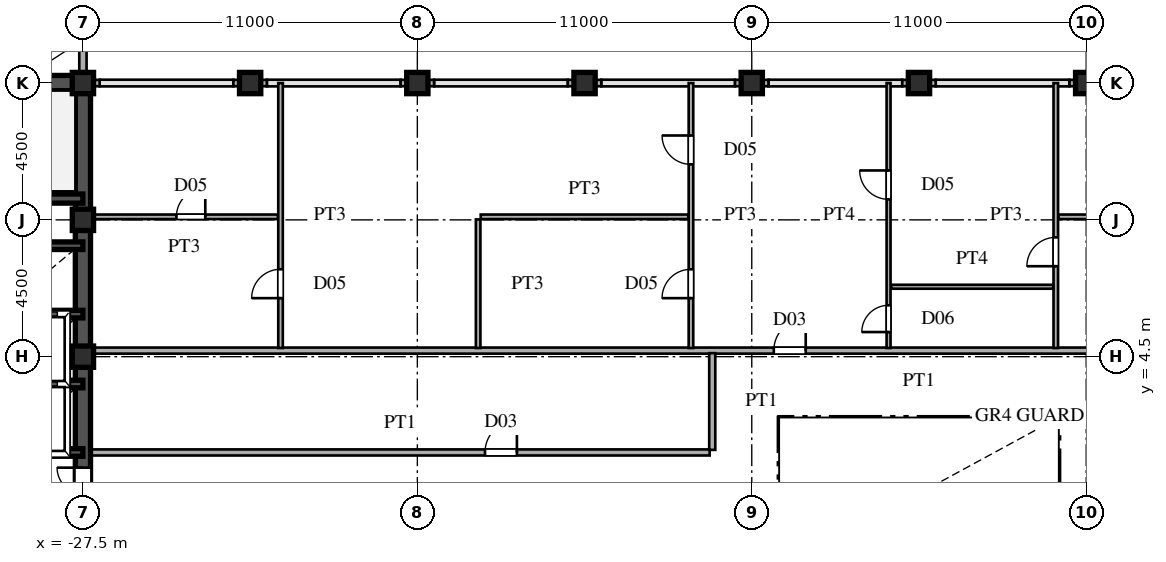
"""IFC4 building model, lengths in metres.
Left out: names, types, materials, properties, quantities, classifications, styles, units other than length and angle.
Written with IfcOpenShell. Run it as: python <this file> out.ifc"""

import sys

from ifc_helpers import new_model, si_unit, direction, frame, frame_2d, origin, origin_2d, place, context, subcontext, project, spatial, rectangle, hollow_rectangle, extrude, source, transform, mapped, element, fill, save


model = new_model("IFC4")
c1 = context("Model", 3, precision=1e-05, world=origin(), true_north=direction((0.0, 1.0)))
c2 = subcontext(c1, "Body", "Model", "MODEL_VIEW")
j1 = project(units=[si_unit("LENGTHUNIT", "METRE"), si_unit("PLANEANGLEUNIT", "RADIAN")], contexts=[c1])
p1 = place(None, origin())
s1 = spatial("IfcSite", under=j1, at=p1, CompositionType="ELEMENT")
p2 = place(p1, origin())
s2 = spatial("IfcBuilding", under=s1, at=p2, CompositionType="ELEMENT")
p3 = place(p2, frame((0.0, 0.0, 265.65)))
s3 = spatial("IfcBuildingStorey", under=s2, at=p3, CompositionType="ELEMENT", Elevation=265.65)
m1 = source(origin(), c2, "Body", "SweptSolid", [
    extrude(hollow_rectangle(XDim=0.7, YDim=0.7, WallThickness=0.03, at=origin_2d()), origin(), (0.0, 0.0, 1.0), 3.75),
])
for number, where, z_axis, x_axis in (
    (1, (-27.5, 4.5, 0.0), (0.0, 0.0, 1.0), (1.0, 0.0, 0.0)),
    (2, (-27.5, 9.0, 0.0), (0.0, 0.0, 1.0), (1.0, 0.0, 0.0)),
    (3, (-27.5, 13.5, 0.0), (0.0, 0.0, 1.0), (1.0, 0.0, 0.0)),
    (4, (-22.0, 13.5, 0.0), (0.0, 0.0, 1.0), (1.0, 0.0, 0.0)),
    (5, (-16.5, 13.5, 0.0), (0.0, 0.0, 1.0), (1.0, 0.0, 0.0)),
    (6, (-11.0, 13.5, 0.0), (0.0, 0.0, 1.0), (1.0, 0.0, 0.0)),
    (7, (-5.5, 13.5, 0.0), (0.0, 0.0, 1.0), (1.0, 0.0, 0.0)),
    (8, (0.0, 13.5, 0.0), (0.0, 0.0, 1.0), (1.0, 0.0, 0.0)),
    (9, (5.5, 13.5, 0.0), (0.0, 0.0, 1.0), (1.0, 0.0, 0.0)),
):
    element("IfcColumn", number, at=place(p3, frame(where, z_axis=z_axis, x_axis=x_axis)), inside=s3, PredefinedType="COLUMN", context=c2, shape_type="MappedRepresentation", body=[
        mapped(m1, transform((0.0, 0.0, 0.0), scale=1.0)),
    ])
p4 = place(p3, frame((-27.5, 13.755, 0.0), z_axis=(0.0, 0.0, 1.0), x_axis=(0.0, 1.0, 0.0)))
e10 = element("IfcWall", 10, at=p4, inside=s3, PredefinedType="SOLIDWALL", context=c2, shape_type="SweptSolid", body=[
    extrude(rectangle(XDim=0.62, YDim=0.24, at=frame_2d((0.31, 0.0))), origin(), (0.0, 0.0, 1.0), 2.99),
])
p5 = place(p3, frame((-27.5, 14.375, 0.0), z_axis=(0.0, 0.0, 1.0), x_axis=(0.0, 1.0, 0.0)))
e11 = element("IfcWall", 11, at=p5, inside=s3, PredefinedType="SOLIDWALL", context=c2, shape_type="SweptSolid", body=[
    extrude(rectangle(XDim=1.605, YDim=0.24, at=frame_2d((0.803, 0.0))), origin(), (0.0, 0.0, 1.0), 3.49),
])
p6 = place(p3, frame((-27.49, 13.5, 0.0), z_axis=(0.0, 0.0, 1.0), x_axis=(1.0, 0.0, 0.0)))
e12 = element("IfcWall", 12, at=p6, inside=s3, PredefinedType="SOLIDWALL", context=c2, shape_type="SweptSolid", body=[
    extrude(rectangle(XDim=0.54, YDim=0.21, at=frame_2d((0.27, 0.0))), origin(), (0.0, 0.0, 1.0), 2.99),
])
for number, where, z_axis, x_axis in (
    (13, (-22.55, 13.5, 0.0), (0.0, 0.0, 1.0), (1.0, 0.0, 0.0)),
    (14, (-17.05, 13.5, 0.0), (0.0, 0.0, 1.0), (1.0, 0.0, 0.0)),
    (15, (-11.55, 13.5, 0.0), (0.0, 0.0, 1.0), (1.0, 0.0, 0.0)),
    (16, (-6.05, 13.5, 0.0), (0.0, 0.0, 1.0), (1.0, 0.0, 0.0)),
    (17, (-0.55, 13.5, 0.0), (0.0, 0.0, 1.0), (1.0, 0.0, 0.0)),
    (18, (4.95, 13.5, 0.0), (0.0, 0.0, 1.0), (1.0, 0.0, 0.0)),
):
    element("IfcWall", number, at=place(p3, frame(where, z_axis=z_axis, x_axis=x_axis)), inside=s3, PredefinedType="SOLIDWALL", context=c2, shape_type="SweptSolid", body=[
        extrude(rectangle(XDim=1.1, YDim=0.21, at=frame_2d((0.55, 0.0))), origin(), (0.0, 0.0, 1.0), 2.99),
    ])
p7 = place(p3, frame((-27.5, 1.3, 0.0), z_axis=(0.0, 0.0, 1.0), x_axis=(0.0, 1.0, 0.0)))
e19 = element("IfcWall", 19, at=p7, inside=s3, PredefinedType="SHEAR", context=c2, shape_type="SweptSolid", body=[
    extrude(rectangle(XDim=12.2, YDim=0.5, at=frame_2d((6.1, 0.0))), origin(), (0.0, 0.0, 1.0), 3.49),
])
p8 = place(p3, frame((-27.5, -1.3, 0.0), z_axis=(0.0, 0.0, 1.0), x_axis=(0.0, 1.0, 0.0)))
e20 = element("IfcWall", 20, at=p8, inside=s3, PredefinedType="SHEAR", context=c2, shape_type="SweptSolid", body=[
    extrude(rectangle(XDim=2.6, YDim=0.5, at=frame_2d((1.3, 0.0))), origin(), (0.0, 0.0, 1.0), 3.49),
])
p9 = place(p8, frame((0.45, 0.0, 0.0)))
e21 = element("IfcOpeningElement", 21, at=p9, cuts=e20, PredefinedType="OPENING", context=c2, shape_type="SweptSolid", body=[
    extrude(rectangle(XDim=1.7, YDim=2.35, at=frame_2d((0.85, 1.175))), frame((0.0, 0.26, 0.0), z_axis=(0.0, -1.0, 0.0), x_axis=(1.0, 0.0, 0.0)), (0.0, 0.0, 1.0), 0.52),
])
p10 = place(p3, frame((-36.5, 13.5, 0.0), z_axis=(0.0, 0.0, 1.0), x_axis=(1.0, 0.0, 0.0)))
e22 = element("IfcWall", 22, at=p10, inside=s3, PredefinedType="SHEAR", context=c2, shape_type="SweptSolid", body=[
    extrude(rectangle(XDim=9.0, YDim=0.5, at=frame_2d((4.5, 0.0))), origin(), (0.0, 0.0, 1.0), 3.49),
])
p11 = place(p3, frame((-36.5, 9.7, 0.0), z_axis=(0.0, 0.0, 1.0), x_axis=(1.0, 0.0, 0.0)))
e23 = element("IfcWall", 23, at=p11, inside=s3, PredefinedType="SHEAR", context=c2, shape_type="SweptSolid", body=[
    extrude(rectangle(XDim=9.0, YDim=0.3, at=frame_2d((4.5, 0.0))), origin(), (0.0, 0.0, 1.0), 3.49),
])
p12 = place(p11, frame((0.6, 0.0, 0.0)))
e24 = element("IfcOpeningElement", 24, at=p12, cuts=e23, PredefinedType="OPENING", context=c2, shape_type="SweptSolid", body=[
    extrude(rectangle(XDim=1.1, YDim=2.2, at=frame_2d((0.55, 1.1))), frame((0.0, 0.16, 0.0), z_axis=(0.0, -1.0, 0.0), x_axis=(1.0, 0.0, 0.0)), (0.0, 0.0, 1.0), 0.32),
])
for number, where, z_axis, x_axis in (
    (25, (-30.3, 1.35, 0.0), (0.0, 0.0, 1.0), (1.0, 0.0, 0.0)),
    (26, (-30.3, 3.6, 0.0), (0.0, 0.0, 1.0), (1.0, 0.0, 0.0)),
    (27, (-30.3, 5.9, 0.0), (0.0, 0.0, 1.0), (1.0, 0.0, 0.0)),
    (28, (-30.3, 8.15, 0.0), (0.0, 0.0, 1.0), (1.0, 0.0, 0.0)),
):
    element("IfcWall", number, at=place(p3, frame(where, z_axis=z_axis, x_axis=x_axis)), inside=s3, PredefinedType="SHEAR", context=c2, shape_type="SweptSolid", body=[
        extrude(rectangle(XDim=2.8, YDim=0.25, at=frame_2d((1.4, 0.0))), origin(), (0.0, 0.0, 1.0), 3.49),
    ])
p13 = place(p3, frame((-27.245, 1.35, 0.0), z_axis=(0.0, 0.0, 1.0), x_axis=(1.0, 0.0, 0.0)))
e29 = element("IfcWall", 29, at=p13, inside=s3, PredefinedType="PARTITIONING", context=c2, shape_type="SweptSolid", body=[
    extrude(rectangle(XDim=20.36, YDim=0.2, at=frame_2d((10.18, 0.0))), origin(), (0.0, 0.0, 1.0), 3.49),
])
p14 = place(p13, frame((12.97, 0.0, 0.0)))
e30 = element("IfcOpeningElement", 30, at=p14, cuts=e29, PredefinedType="OPENING", context=c2, shape_type="SweptSolid", body=[
    extrude(rectangle(XDim=1.05, YDim=2.25, at=frame_2d((0.525, 1.125))), frame((0.0, 0.11, 0.0), z_axis=(0.0, -1.0, 0.0), x_axis=(1.0, 0.0, 0.0)), (0.0, 0.0, 1.0), 0.22),
])
p15 = place(p3, frame((-27.245, 4.7, 0.0), z_axis=(0.0, 0.0, 1.0), x_axis=(1.0, 0.0, 0.0)))
e31 = element("IfcWall", 31, at=p15, inside=s3, PredefinedType="PARTITIONING", context=c2, shape_type="SweptSolid", body=[
    extrude(rectangle(XDim=54.49, YDim=0.2, at=frame_2d((27.245, 0.0))), origin(), (0.0, 0.0, 1.0), 3.49),
])
p16 = place(p15, frame((22.47, 0.0, 0.0)))
e32 = element("IfcOpeningElement", 32, at=p16, cuts=e31, PredefinedType="OPENING", context=c2, shape_type="SweptSolid", body=[
    extrude(rectangle(XDim=1.05, YDim=2.25, at=frame_2d((0.525, 1.125))), frame((0.0, 0.11, 0.0), z_axis=(0.0, -1.0, 0.0), x_axis=(1.0, 0.0, 0.0)), (0.0, 0.0, 1.0), 0.22),
])
p17 = place(p3, frame((-0.915, 6.8, 0.0), z_axis=(0.0, 0.0, 1.0), x_axis=(1.0, 0.0, 0.0)))
e33 = element("IfcWall", 33, at=p17, inside=s3, PredefinedType="PARTITIONING", context=c2, shape_type="SweptSolid", body=[
    extrude(rectangle(XDim=5.33, YDim=0.13, at=frame_2d((2.665, 0.0))), origin(), (0.0, 0.0, 1.0), 3.14),
])
p18 = place(p3, frame((-27.245, 9.1, 0.0), z_axis=(0.0, 0.0, 1.0), x_axis=(1.0, 0.0, 0.0)))
e34 = element("IfcWall", 34, at=p18, inside=s3, PredefinedType="PARTITIONING", context=c2, shape_type="SweptSolid", body=[
    extrude(rectangle(XDim=6.16, YDim=0.15, at=frame_2d((3.08, 0.0))), origin(), (0.0, 0.0, 1.0), 3.49),
])
p19 = place(p18, frame((2.82, 0.0, 0.0)))
e35 = element("IfcOpeningElement", 35, at=p19, cuts=e34, PredefinedType="OPENING", context=c2, shape_type="SweptSolid", body=[
    extrude(rectangle(XDim=0.95, YDim=2.15, at=frame_2d((0.475, 1.075))), frame((0.0, 0.085, 0.0), z_axis=(0.0, -1.0, 0.0), x_axis=(1.0, 0.0, 0.0)), (0.0, 0.0, 1.0), 0.17),
])
p20 = place(p3, frame((-14.415, 9.1, 0.0), z_axis=(0.0, 0.0, 1.0), x_axis=(1.0, 0.0, 0.0)))
e36 = element("IfcWall", 36, at=p20, inside=s3, PredefinedType="PARTITIONING", context=c2, shape_type="SweptSolid", body=[
    extrude(rectangle(XDim=6.83, YDim=0.15, at=frame_2d((3.415, 0.0))), origin(), (0.0, 0.0, 1.0), 3.49),
])
p21 = place(p3, frame((4.585, 9.1, 0.0), z_axis=(0.0, 0.0, 1.0), x_axis=(1.0, 0.0, 0.0)))
e37 = element("IfcWall", 37, at=p21, inside=s3, PredefinedType="PARTITIONING", context=c2, shape_type="SweptSolid", body=[
    extrude(rectangle(XDim=22.66, YDim=0.15, at=frame_2d((11.33, 0.0))), origin(), (0.0, 0.0, 1.0), 3.49),
])
p22 = place(p21, frame((3.94, 0.0, 0.0)))
e38 = element("IfcOpeningElement", 38, at=p22, cuts=e37, PredefinedType="OPENING", context=c2, shape_type="SweptSolid", body=[
    extrude(rectangle(XDim=0.95, YDim=2.15, at=frame_2d((0.475, 1.075))), frame((0.0, 0.085, 0.0), z_axis=(0.0, -1.0, 0.0), x_axis=(1.0, 0.0, 0.0)), (0.0, 0.0, 1.0), 0.17),
])
p23 = place(p21, frame((11.94, 0.0, 0.0)))
e39 = element("IfcOpeningElement", 39, at=p23, cuts=e37, PredefinedType="OPENING", context=c2, shape_type="SweptSolid", body=[
    extrude(rectangle(XDim=0.95, YDim=2.15, at=frame_2d((0.475, 1.075))), frame((0.0, 0.085, 0.0), z_axis=(0.0, -1.0, 0.0), x_axis=(1.0, 0.0, 0.0)), (0.0, 0.0, 1.0), 0.17),
])
p24 = place(p21, frame((18.94, 0.0, 0.0)))
e40 = element("IfcOpeningElement", 40, at=p24, cuts=e37, PredefinedType="OPENING", context=c2, shape_type="SweptSolid", body=[
    extrude(rectangle(XDim=0.95, YDim=2.15, at=frame_2d((0.475, 1.075))), frame((0.0, 0.085, 0.0), z_axis=(0.0, -1.0, 0.0), x_axis=(1.0, 0.0, 0.0)), (0.0, 0.0, 1.0), 0.17),
])
p25 = place(p3, frame((-21.0, 4.785, 0.0), z_axis=(0.0, 0.0, 1.0), x_axis=(0.0, 1.0, 0.0)))
e41 = element("IfcWall", 41, at=p25, inside=s3, PredefinedType="PARTITIONING", context=c2, shape_type="SweptSolid", body=[
    extrude(rectangle(XDim=8.715, YDim=0.15, at=frame_2d((4.357, 0.0))), origin(), (0.0, 0.0, 1.0), 3.49),
])
p26 = place(p25, frame((1.64, 0.0, 0.0)))
e42 = element("IfcOpeningElement", 42, at=p26, cuts=e41, PredefinedType="OPENING", context=c2, shape_type="SweptSolid", body=[
    extrude(rectangle(XDim=0.95, YDim=2.15, at=frame_2d((0.475, 1.075))), frame((0.0, 0.085, 0.0), z_axis=(0.0, -1.0, 0.0), x_axis=(1.0, 0.0, 0.0)), (0.0, 0.0, 1.0), 0.17),
])
p27 = place(p3, frame((-14.5, 4.785, 0.0), z_axis=(0.0, 0.0, 1.0), x_axis=(0.0, 1.0, 0.0)))
e43 = element("IfcWall", 43, at=p27, inside=s3, PredefinedType="PARTITIONING", context=c2, shape_type="SweptSolid", body=[
    extrude(rectangle(XDim=4.23, YDim=0.15, at=frame_2d((2.115, 0.0))), origin(), (0.0, 0.0, 1.0), 3.49),
])
p28 = place(p3, frame((-7.5, 4.785, 0.0), z_axis=(0.0, 0.0, 1.0), x_axis=(0.0, 1.0, 0.0)))
e44 = element("IfcWall", 44, at=p28, inside=s3, PredefinedType="PARTITIONING", context=c2, shape_type="SweptSolid", body=[
    extrude(rectangle(XDim=8.715, YDim=0.15, at=frame_2d((4.357, 0.0))), origin(), (0.0, 0.0, 1.0), 3.49),
])
p29 = place(p28, frame((1.64, 0.0, 0.0)))
e45 = element("IfcOpeningElement", 45, at=p29, cuts=e44, PredefinedType="OPENING", context=c2, shape_type="SweptSolid", body=[
    extrude(rectangle(XDim=0.95, YDim=2.15, at=frame_2d((0.475, 1.075))), frame((0.0, 0.085, 0.0), z_axis=(0.0, -1.0, 0.0), x_axis=(1.0, 0.0, 0.0)), (0.0, 0.0, 1.0), 0.17),
])
p30 = place(p28, frame((6.04, 0.0, 0.0)))
e46 = element("IfcOpeningElement", 46, at=p30, cuts=e44, PredefinedType="OPENING", context=c2, shape_type="SweptSolid", body=[
    extrude(rectangle(XDim=0.95, YDim=2.15, at=frame_2d((0.475, 1.075))), frame((0.0, 0.085, 0.0), z_axis=(0.0, -1.0, 0.0), x_axis=(1.0, 0.0, 0.0)), (0.0, 0.0, 1.0), 0.17),
])
p31 = place(p3, frame((-6.8, 1.435, 0.0), z_axis=(0.0, 0.0, 1.0), x_axis=(0.0, 1.0, 0.0)))
e47 = element("IfcWall", 47, at=p31, inside=s3, PredefinedType="PARTITIONING", context=c2, shape_type="SweptSolid", body=[
    extrude(rectangle(XDim=3.18, YDim=0.2, at=frame_2d((1.59, 0.0))), origin(), (0.0, 0.0, 1.0), 3.49),
])
p32 = place(p3, frame((-1.0, 4.785, 0.0), z_axis=(0.0, 0.0, 1.0), x_axis=(0.0, 1.0, 0.0)))
e48 = element("IfcWall", 48, at=p32, inside=s3, PredefinedType="PARTITIONING", context=c2, shape_type="SweptSolid", body=[
    extrude(rectangle(XDim=8.715, YDim=0.13, at=frame_2d((4.357, 0.0))), origin(), (0.0, 0.0, 1.0), 3.49),
])
p33 = place(p32, frame((0.525, 0.0, 0.0)))
e49 = element("IfcOpeningElement", 49, at=p33, cuts=e48, PredefinedType="OPENING", context=c2, shape_type="SweptSolid", body=[
    extrude(rectangle(XDim=0.88, YDim=2.1, at=frame_2d((0.44, 1.05))), frame((0.0, 0.075, 0.0), z_axis=(0.0, -1.0, 0.0), x_axis=(1.0, 0.0, 0.0)), (0.0, 0.0, 1.0), 0.15),
])
p34 = place(p32, frame((4.89, 0.0, 0.0)))
e50 = element("IfcOpeningElement", 50, at=p34, cuts=e48, PredefinedType="OPENING", context=c2, shape_type="SweptSolid", body=[
    extrude(rectangle(XDim=0.95, YDim=2.15, at=frame_2d((0.475, 1.075))), frame((0.0, 0.075, 0.0), z_axis=(0.0, -1.0, 0.0), x_axis=(1.0, 0.0, 0.0)), (0.0, 0.0, 1.0), 0.15),
])
p35 = place(p3, frame((4.5, 4.785, 0.0), z_axis=(0.0, 0.0, 1.0), x_axis=(0.0, 1.0, 0.0)))
e51 = element("IfcWall", 51, at=p35, inside=s3, PredefinedType="PARTITIONING", context=c2, shape_type="SweptSolid", body=[
    extrude(rectangle(XDim=8.715, YDim=0.15, at=frame_2d((4.357, 0.0))), origin(), (0.0, 0.0, 1.0), 3.49),
])
p36 = place(p35, frame((2.69, 0.0, 0.0)))
e52 = element("IfcOpeningElement", 52, at=p36, cuts=e51, PredefinedType="OPENING", context=c2, shape_type="SweptSolid", body=[
    extrude(rectangle(XDim=0.95, YDim=2.15, at=frame_2d((0.475, 1.075))), frame((0.0, 0.085, 0.0), z_axis=(0.0, -1.0, 0.0), x_axis=(1.0, 0.0, 0.0)), (0.0, 0.0, 1.0), 0.17),
])
m2 = source(origin(), c2, "Body", "SweptSolid", [
    extrude(rectangle(XDim=1.7, YDim=2.35, at=frame_2d((0.85, 1.175))), frame((0.0, 0.025, 0.0), z_axis=(0.0, -1.0, 0.0), x_axis=(1.0, 0.0, 0.0)), (0.0, 0.0, 1.0), 0.05),
])
p37 = place(p9, origin())
e53 = element("IfcDoor", 53, at=p37, inside=s3, OperationType="DOUBLE_SWING_LEFT", PredefinedType="DOOR", context=c2, shape_type="MappedRepresentation", body=[
    mapped(m2, transform((0.0, 0.0, 0.0), scale=1.0)),
])
fill(e21, e53)
m3 = source(origin(), c2, "Body", "SweptSolid", [
    extrude(rectangle(XDim=1.05, YDim=2.25, at=frame_2d((0.525, 1.125))), frame((0.0, 0.025, 0.0), z_axis=(0.0, -1.0, 0.0), x_axis=(1.0, 0.0, 0.0)), (0.0, 0.0, 1.0), 0.05),
])
p38 = place(p14, origin())
e54 = element("IfcDoor", 54, at=p38, inside=s3, OperationType="SINGLE_SWING_RIGHT", PredefinedType="DOOR", context=c2, shape_type="MappedRepresentation", body=[
    mapped(m3, transform((0.0, 0.0, 0.0), scale=1.0)),
])
fill(e30, e54)
p39 = place(p16, origin())
e55 = element("IfcDoor", 55, at=p39, inside=s3, OperationType="SINGLE_SWING_RIGHT", PredefinedType="DOOR", context=c2, shape_type="MappedRepresentation", body=[
    mapped(m3, transform((0.0, 0.0, 0.0), scale=1.0)),
])
fill(e32, e55)
m4 = source(origin(), c2, "Body", "SweptSolid", [
    extrude(rectangle(XDim=0.95, YDim=2.15, at=frame_2d((0.475, 1.075))), frame((0.0, 0.025, 0.0), z_axis=(0.0, -1.0, 0.0), x_axis=(1.0, 0.0, 0.0)), (0.0, 0.0, 1.0), 0.05),
])
p40 = place(p19, origin())
e56 = element("IfcDoor", 56, at=p40, inside=s3, OperationType="SINGLE_SWING_RIGHT", PredefinedType="DOOR", context=c2, shape_type="MappedRepresentation", body=[
    mapped(m4, transform((0.0, 0.0, 0.0), scale=1.0)),
])
fill(e35, e56)
p41 = place(p26, origin())
e57 = element("IfcDoor", 57, at=p41, inside=s3, OperationType="SINGLE_SWING_LEFT", PredefinedType="DOOR", context=c2, shape_type="MappedRepresentation", body=[
    mapped(m4, transform((0.0, 0.0, 0.0), scale=1.0)),
])
fill(e42, e57)
p42 = place(p29, origin())
e58 = element("IfcDoor", 58, at=p42, inside=s3, OperationType="SINGLE_SWING_LEFT", PredefinedType="DOOR", context=c2, shape_type="MappedRepresentation", body=[
    mapped(m4, transform((0.0, 0.0, 0.0), scale=1.0)),
])
fill(e45, e58)
p43 = place(p30, origin())
e59 = element("IfcDoor", 59, at=p43, inside=s3, OperationType="SINGLE_SWING_RIGHT", PredefinedType="DOOR", context=c2, shape_type="MappedRepresentation", body=[
    mapped(m4, transform((0.0, 0.0, 0.0), scale=1.0)),
])
fill(e46, e59)
m5 = source(origin(), c2, "Body", "SweptSolid", [
    extrude(rectangle(XDim=0.88, YDim=2.1, at=frame_2d((0.44, 1.05))), frame((0.0, 0.025, 0.0), z_axis=(0.0, -1.0, 0.0), x_axis=(1.0, 0.0, 0.0)), (0.0, 0.0, 1.0), 0.05),
])
p44 = place(p33, origin())
e60 = element("IfcDoor", 60, at=p44, inside=s3, OperationType="SINGLE_SWING_LEFT", PredefinedType="DOOR", context=c2, shape_type="MappedRepresentation", body=[
    mapped(m5, transform((0.0, 0.0, 0.0), scale=1.0)),
])
fill(e49, e60)
p45 = place(p34, origin())
e61 = element("IfcDoor", 61, at=p45, inside=s3, OperationType="SINGLE_SWING_RIGHT", PredefinedType="DOOR", context=c2, shape_type="MappedRepresentation", body=[
    mapped(m4, transform((0.0, 0.0, 0.0), scale=1.0)),
])
fill(e50, e61)
p46 = place(p36, origin())
e62 = element("IfcDoor", 62, at=p46, inside=s3, OperationType="SINGLE_SWING_LEFT", PredefinedType="DOOR", context=c2, shape_type="MappedRepresentation", body=[
    mapped(m4, transform((0.0, 0.0, 0.0), scale=1.0)),
])
fill(e52, e62)
save(model, sys.argv[1])
